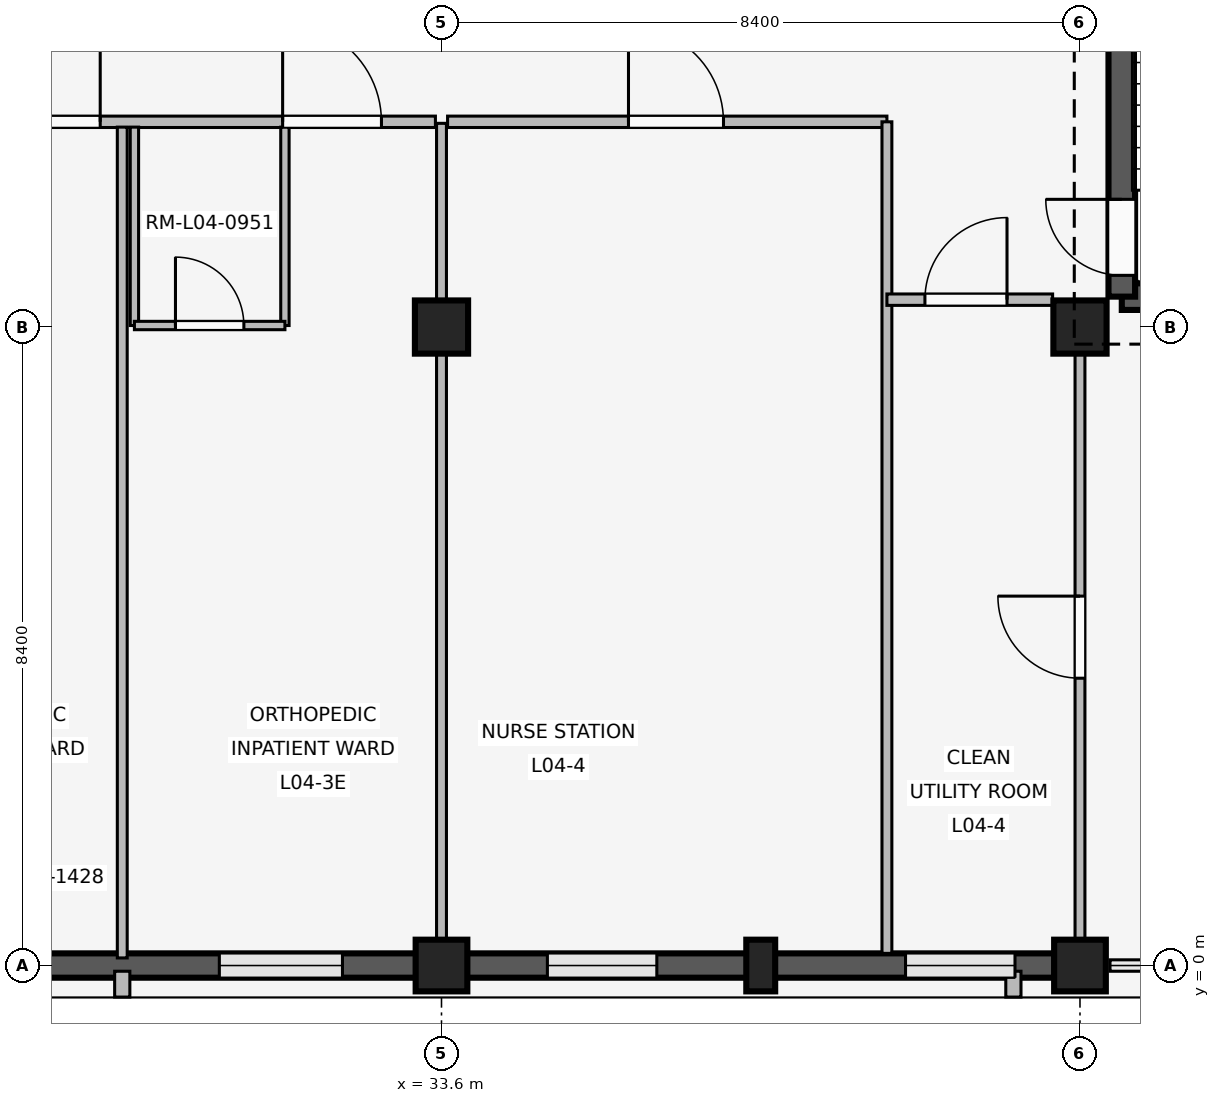
"""IFC4 building model, lengths in metres.
Left out: names, types, materials, properties, quantities, classifications, styles, units other than length and angle.
Written with IfcOpenShell. Run it as: python <this file> out.ifc"""

import sys

from ifc_helpers import new_model, si_unit, direction, frame, frame_2d, origin, origin_2d, place, context, subcontext, project, spatial, rectangle, extrude, element, fill, save


model = new_model("IFC4")
c1 = context("Model", 3, precision=1e-05, world=origin(), true_north=direction((0.0, 1.0)))
c2 = subcontext(c1, "Body", "Model", "MODEL_VIEW")
j1 = project(units=[si_unit("LENGTHUNIT", "METRE"), si_unit("PLANEANGLEUNIT", "RADIAN")], contexts=[c1])
p1 = place(None, origin())
s1 = spatial("IfcSite", under=j1, at=p1, CompositionType="ELEMENT")
p2 = place(p1, origin())
s2 = spatial("IfcBuilding", under=s1, at=p2, CompositionType="ELEMENT")
p3 = place(p2, frame((0.0, 0.0, 16.2)))
s3 = spatial("IfcBuildingStorey", under=s2, at=p3, CompositionType="ELEMENT", Elevation=16.2)
p4 = place(p3, frame((33.6, 0.0, 0.0), z_axis=(0.0, 0.0, 1.0), x_axis=(1.0, 0.0, 0.0)))
e1 = element("IfcColumn", 1, at=p4, inside=s3, PredefinedType="COLUMN", context=c2, shape_type="SweptSolid", body=[
    extrude(rectangle(XDim=0.68, YDim=0.68, at=origin_2d()), origin(), (0.0, 0.0, 1.0), 4.2),
])
p5 = place(p3, frame((33.6, 8.4, 0.0), z_axis=(0.0, 0.0, 1.0), x_axis=(1.0, 0.0, 0.0)))
e2 = element("IfcColumn", 2, at=p5, inside=s3, PredefinedType="COLUMN", context=c2, shape_type="SweptSolid", body=[
    extrude(rectangle(XDim=0.7, YDim=0.7, at=origin_2d()), origin(), (0.0, 0.0, 1.0), 4.2),
])
p6 = place(p3, frame((42.0, 0.0, 0.0), z_axis=(0.0, 0.0, 1.0), x_axis=(1.0, 0.0, 0.0)))
e3 = element("IfcColumn", 3, at=p6, inside=s3, PredefinedType="COLUMN", context=c2, shape_type="SweptSolid", body=[
    extrude(rectangle(XDim=0.68, YDim=0.68, at=origin_2d()), origin(), (0.0, 0.0, 1.0), 4.2),
])
p7 = place(p3, frame((42.0, 8.4, 0.0), z_axis=(0.0, 0.0, 1.0), x_axis=(1.0, 0.0, 0.0)))
e4 = element("IfcColumn", 4, at=p7, inside=s3, PredefinedType="COLUMN", context=c2, shape_type="SweptSolid", body=[
    extrude(rectangle(XDim=0.7, YDim=0.7, at=origin_2d()), origin(), (0.0, 0.0, 1.0), 4.2),
])
p8 = place(p3, frame((37.8, 0.0, 0.0), z_axis=(0.0, 0.0, 1.0), x_axis=(1.0, 0.0, 0.0)))
e5 = element("IfcColumn", 5, at=p8, inside=s3, PredefinedType="PILASTER", context=c2, shape_type="SweptSolid", body=[
    extrude(rectangle(XDim=0.38, YDim=0.68, at=origin_2d()), origin(), (0.0, 0.0, 1.0), 4.2),
])
p9 = place(p3, frame((33.265, 0.0, 0.0), z_axis=(0.0, 0.0, 1.0), x_axis=(-1.0, 0.0, 0.0)))
e6 = element("IfcWall", 6, at=p9, inside=s3, PredefinedType="SOLIDWALL", context=c2, shape_type="SweptSolid", body=[
    extrude(rectangle(XDim=7.73, YDim=0.32, at=frame_2d((3.865, 0.0))), origin(), (0.0, 0.0, 1.0), 3.32),
])
p10 = place(p9, frame((0.968, 0.0, 0.85)))
e7 = element("IfcOpeningElement", 7, at=p10, cuts=e6, PredefinedType="OPENING", context=c2, shape_type="SweptSolid", body=[
    extrude(rectangle(XDim=1.62, YDim=1.8, at=frame_2d((0.81, 0.9))), frame((0.0, 0.17, 0.0), z_axis=(0.0, -1.0, 0.0), x_axis=(1.0, 0.0, 0.0)), (0.0, 0.0, 1.0), 0.34),
])
p11 = place(p9, frame((5.142, 0.0, 0.85)))
e8 = element("IfcOpeningElement", 8, at=p11, cuts=e6, PredefinedType="OPENING", context=c2, shape_type="SweptSolid", body=[
    extrude(rectangle(XDim=1.62, YDim=1.8, at=frame_2d((0.81, 0.9))), frame((0.0, 0.17, 0.0), z_axis=(0.0, -1.0, 0.0), x_axis=(1.0, 0.0, 0.0)), (0.0, 0.0, 1.0), 0.34),
])
p12 = place(p3, frame((29.4, -0.075, 0.0), z_axis=(0.0, 0.0, 1.0), x_axis=(0.0, -1.0, 0.0)))
e9 = element("IfcWall", 9, at=p12, inside=s3, PredefinedType="ELEMENTEDWALL", context=c2, shape_type="SweptSolid", body=[
    extrude(rectangle(XDim=0.34, YDim=0.2, at=frame_2d((0.17, 0.0))), origin(), (0.0, 0.0, 1.0), 3.3),
])
p13 = place(p3, frame((41.665, 0.0, 0.0), z_axis=(0.0, 0.0, 1.0), x_axis=(-1.0, 0.0, 0.0)))
e10 = element("IfcWall", 10, at=p13, inside=s3, PredefinedType="SOLIDWALL", context=c2, shape_type="SweptSolid", body=[
    extrude(rectangle(XDim=7.73, YDim=0.32, at=frame_2d((3.865, 0.0))), origin(), (0.0, 0.0, 1.0), 3.32),
])
p14 = place(p13, frame((0.52, 0.0, 0.85)))
e11 = element("IfcOpeningElement", 11, at=p14, cuts=e10, PredefinedType="OPENING", context=c2, shape_type="SweptSolid", body=[
    extrude(rectangle(XDim=1.44, YDim=1.62, at=frame_2d((0.72, 0.81))), frame((0.0, 0.17, 0.0), z_axis=(0.0, -1.0, 0.0), x_axis=(1.0, 0.0, 0.0)), (0.0, 0.0, 1.0), 0.34),
])
p15 = place(p13, frame((5.232, 0.0, 0.85)))
e12 = element("IfcOpeningElement", 12, at=p15, cuts=e10, PredefinedType="OPENING", context=c2, shape_type="SweptSolid", body=[
    extrude(rectangle(XDim=1.44, YDim=1.62, at=frame_2d((0.72, 0.81))), frame((0.0, 0.17, 0.0), z_axis=(0.0, -1.0, 0.0), x_axis=(1.0, 0.0, 0.0)), (0.0, 0.0, 1.0), 0.34),
])
p16 = place(p3, frame((41.124, -0.075, 0.0), z_axis=(0.0, 0.0, 1.0), x_axis=(0.0, -1.0, 0.0)))
e13 = element("IfcWall", 13, at=p16, inside=s3, PredefinedType="ELEMENTEDWALL", context=c2, shape_type="SweptSolid", body=[
    extrude(rectangle(XDim=0.34, YDim=0.2, at=frame_2d((0.17, 0.0))), origin(), (0.0, 0.0, 1.0), 3.3),
])
p17 = place(p3, frame((42.55, 8.8, 0.0), z_axis=(0.0, 0.0, 1.0), x_axis=(1.0, 0.0, 0.0)))
e14 = element("IfcWall", 14, at=p17, inside=s3, PredefinedType="SHEAR", context=c2, shape_type="SweptSolid", body=[
    extrude(rectangle(XDim=7.5, YDim=0.35, at=frame_2d((3.75, 0.0))), origin(), (0.0, 0.0, 1.0), 3.92),
])
p18 = place(p17, frame((4.85, 0.0, 0.0)))
e15 = element("IfcOpeningElement", 15, at=p18, cuts=e14, PredefinedType="OPENING", context=c2, shape_type="SweptSolid", body=[
    extrude(rectangle(XDim=1.2, YDim=2.2, at=frame_2d((0.6, 1.1))), frame((0.0, 0.185, 0.0), z_axis=(0.0, -1.0, 0.0), x_axis=(1.0, 0.0, 0.0)), (0.0, 0.0, 1.0), 0.37),
])
p19 = place(p3, frame((42.55, 8.8, 0.0), z_axis=(0.0, 0.0, 1.0), x_axis=(0.0, 1.0, 0.0)))
e16 = element("IfcWall", 16, at=p19, inside=s3, PredefinedType="SHEAR", context=c2, shape_type="SweptSolid", body=[
    extrude(rectangle(XDim=7.55, YDim=0.35, at=frame_2d((3.775, 0.0))), origin(), (0.0, 0.0, 1.0), 3.92),
])
p20 = place(p19, frame((0.28, 0.0, 0.0)))
e17 = element("IfcOpeningElement", 17, at=p20, cuts=e16, PredefinedType="OPENING", context=c2, shape_type="SweptSolid", body=[
    extrude(rectangle(XDim=1.0, YDim=2.15, at=frame_2d((0.5, 1.075))), frame((0.0, 0.185, 0.0), z_axis=(0.0, -1.0, 0.0), x_axis=(1.0, 0.0, 0.0)), (0.0, 0.0, 1.0), 0.37),
])
p21 = place(p3, frame((25.28, 11.1, 0.0), z_axis=(0.0, 0.0, 1.0), x_axis=(1.0, 0.0, 0.0)))
e18 = element("IfcWall", 18, at=p21, inside=s3, PredefinedType="PARTITIONING", context=c2, shape_type="SweptSolid", body=[
    extrude(rectangle(XDim=8.24, YDim=0.15, at=frame_2d((4.12, 0.0))), origin(), (0.0, 0.0, 1.0), 3.3),
])
p22 = place(p21, frame((2.53, 0.0, 0.0)))
e19 = element("IfcOpeningElement", 19, at=p22, cuts=e18, PredefinedType="OPENING", context=c2, shape_type="SweptSolid", body=[
    extrude(rectangle(XDim=1.3, YDim=2.25, at=frame_2d((0.65, 1.125))), frame((0.0, 0.085, 0.0), z_axis=(0.0, -1.0, 0.0), x_axis=(1.0, 0.0, 0.0)), (0.0, 0.0, 1.0), 0.17),
])
p23 = place(p21, frame((6.23, 0.0, 0.0)))
e20 = element("IfcOpeningElement", 20, at=p23, cuts=e18, PredefinedType="OPENING", context=c2, shape_type="SweptSolid", body=[
    extrude(rectangle(XDim=1.3, YDim=2.25, at=frame_2d((0.65, 1.125))), frame((0.0, 0.085, 0.0), z_axis=(0.0, -1.0, 0.0), x_axis=(1.0, 0.0, 0.0)), (0.0, 0.0, 1.0), 0.17),
])
p24 = place(p3, frame((29.4, 0.1, 0.0), z_axis=(0.0, 0.0, 1.0), x_axis=(0.0, 1.0, 0.0)))
e21 = element("IfcWall", 21, at=p24, inside=s3, PredefinedType="PARTITIONING", context=c2, shape_type="SweptSolid", body=[
    extrude(rectangle(XDim=10.93, YDim=0.13, at=frame_2d((5.465, 0.0))), origin(), (0.0, 0.0, 1.0), 3.3),
])
for number, where, z_axis, x_axis in (
    (22, (29.56, 8.42, 0.0), (0.0, 0.0, 1.0), (0.0, 1.0, 0.0)),
    (23, (31.54, 8.42, 0.0), (0.0, 0.0, 1.0), (0.0, 1.0, 0.0)),
):
    element("IfcWall", number, at=place(p3, frame(where, z_axis=z_axis, x_axis=x_axis)), inside=s3, PredefinedType="PARTITIONING", context=c2, shape_type="SweptSolid", body=[
        extrude(rectangle(XDim=2.61, YDim=0.11, at=frame_2d((1.305, 0.0))), origin(), (0.0, 0.0, 1.0), 3.3),
    ])
p25 = place(p3, frame((29.56, 8.42, 0.0), z_axis=(0.0, 0.0, 1.0), x_axis=(1.0, 0.0, 0.0)))
e24 = element("IfcWall", 24, at=p25, inside=s3, PredefinedType="PARTITIONING", context=c2, shape_type="SweptSolid", body=[
    extrude(rectangle(XDim=1.98, YDim=0.11, at=frame_2d((0.99, 0.0))), origin(), (0.0, 0.0, 1.0), 3.3),
])
p26 = place(p25, frame((0.54, 0.0, 0.0)))
e25 = element("IfcOpeningElement", 25, at=p26, cuts=e24, PredefinedType="OPENING", context=c2, shape_type="SweptSolid", body=[
    extrude(rectangle(XDim=0.9, YDim=2.1, at=frame_2d((0.45, 1.05))), frame((0.0, 0.065, 0.0), z_axis=(0.0, -1.0, 0.0), x_axis=(1.0, 0.0, 0.0)), (0.0, 0.0, 1.0), 0.13),
])
p27 = place(p3, frame((28.05, 1.15, 0.0), z_axis=(0.0, 0.0, 1.0), x_axis=(1.0, 0.0, 0.0)))
e26 = element("IfcWall", 26, at=p27, inside=s3, PredefinedType="PLUMBINGWALL", context=c2, shape_type="SweptSolid", body=[
    extrude(rectangle(XDim=0.9, YDim=0.24, at=frame_2d((0.45, 0.0))), origin(), (0.0, 0.0, 1.0), 3.3),
])
p28 = place(p3, frame((33.6, 0.14, 0.0), z_axis=(0.0, 0.0, 1.0), x_axis=(0.0, 1.0, 0.0)))
e27 = element("IfcWall", 27, at=p28, inside=s3, PredefinedType="PARTITIONING", context=c2, shape_type="SweptSolid", body=[
    extrude(rectangle(XDim=10.94, YDim=0.13, at=frame_2d((5.47, 0.0))), origin(), (0.0, 0.0, 1.0), 3.3),
])
p29 = place(p3, frame((33.68, 11.1, 0.0), z_axis=(0.0, 0.0, 1.0), x_axis=(1.0, 0.0, 0.0)))
e28 = element("IfcWall", 28, at=p29, inside=s3, PredefinedType="PARTITIONING", context=c2, shape_type="SweptSolid", body=[
    extrude(rectangle(XDim=5.78, YDim=0.15, at=frame_2d((2.89, 0.0))), origin(), (0.0, 0.0, 1.0), 3.3),
])
p30 = place(p29, frame((2.38, 0.0, 0.0)))
e29 = element("IfcOpeningElement", 29, at=p30, cuts=e28, PredefinedType="OPENING", context=c2, shape_type="SweptSolid", body=[
    extrude(rectangle(XDim=1.25, YDim=2.2, at=frame_2d((0.625, 1.1))), frame((0.0, 0.085, 0.0), z_axis=(0.0, -1.0, 0.0), x_axis=(1.0, 0.0, 0.0)), (0.0, 0.0, 1.0), 0.17),
])
p31 = place(p3, frame((39.46, 0.16, 0.0), z_axis=(0.0, 0.0, 1.0), x_axis=(0.0, 1.0, 0.0)))
e30 = element("IfcWall", 30, at=p31, inside=s3, PredefinedType="PARTITIONING", context=c2, shape_type="SweptSolid", body=[
    extrude(rectangle(XDim=10.94, YDim=0.13, at=frame_2d((5.47, 0.0))), origin(), (0.0, 0.0, 1.0), 3.3),
])
p32 = place(p3, frame((39.46, 8.76, 0.0), z_axis=(0.0, 0.0, 1.0), x_axis=(1.0, 0.0, 0.0)))
e31 = element("IfcWall", 31, at=p32, inside=s3, PredefinedType="PARTITIONING", context=c2, shape_type="SweptSolid", body=[
    extrude(rectangle(XDim=2.18, YDim=0.15, at=frame_2d((1.09, 0.0))), origin(), (0.0, 0.0, 1.0), 3.3),
])
p33 = place(p32, frame((0.5, 0.0, 0.0)))
e32 = element("IfcOpeningElement", 32, at=p33, cuts=e31, PredefinedType="OPENING", context=c2, shape_type="SweptSolid", body=[
    extrude(rectangle(XDim=1.08, YDim=2.15, at=frame_2d((0.54, 1.075))), frame((0.0, 0.085, 0.0), z_axis=(0.0, -1.0, 0.0), x_axis=(1.0, 0.0, 0.0)), (0.0, 0.0, 1.0), 0.17),
])
p34 = place(p3, frame((42.0, 0.14, 0.0), z_axis=(0.0, 0.0, 1.0), x_axis=(0.0, 1.0, 0.0)))
e33 = element("IfcWall", 33, at=p34, inside=s3, PredefinedType="PARTITIONING", context=c2, shape_type="SweptSolid", body=[
    extrude(rectangle(XDim=8.21, YDim=0.13, at=frame_2d((4.105, 0.0))), origin(), (0.0, 0.0, 1.0), 3.3),
])
p35 = place(p34, frame((3.64, 0.0, 0.0)))
e34 = element("IfcOpeningElement", 34, at=p35, cuts=e33, PredefinedType="OPENING", context=c2, shape_type="SweptSolid", body=[
    extrude(rectangle(XDim=1.08, YDim=2.15, at=frame_2d((0.54, 1.075))), frame((0.0, 0.075, 0.0), z_axis=(0.0, -1.0, 0.0), x_axis=(1.0, 0.0, 0.0)), (0.0, 0.0, 1.0), 0.15),
])
p36 = place(p10, origin())
e35 = element("IfcWindow", 35, at=p36, inside=s3, PartitioningType="SINGLE_PANEL", PredefinedType="WINDOW", context=c2, shape_type="SweptSolid", body=[
    extrude(rectangle(XDim=1.62, YDim=1.8, at=frame_2d((0.81, 0.9))), frame((0.0, 0.03, 0.0), z_axis=(0.0, -1.0, 0.0), x_axis=(1.0, 0.0, 0.0)), (0.0, 0.0, 1.0), 0.06),
])
fill(e7, e35)
p37 = place(p14, origin())
e36 = element("IfcWindow", 36, at=p37, inside=s3, PartitioningType="SINGLE_PANEL", PredefinedType="WINDOW", context=c2, shape_type="SweptSolid", body=[
    extrude(rectangle(XDim=1.44, YDim=1.62, at=frame_2d((0.72, 0.81))), frame((0.0, 0.03, 0.0), z_axis=(0.0, -1.0, 0.0), x_axis=(1.0, 0.0, 0.0)), (0.0, 0.0, 1.0), 0.06),
])
fill(e11, e36)
p38 = place(p15, origin())
e37 = element("IfcWindow", 37, at=p38, inside=s3, PartitioningType="SINGLE_PANEL", PredefinedType="WINDOW", context=c2, shape_type="SweptSolid", body=[
    extrude(rectangle(XDim=1.44, YDim=1.62, at=frame_2d((0.72, 0.81))), frame((0.0, 0.03, 0.0), z_axis=(0.0, -1.0, 0.0), x_axis=(1.0, 0.0, 0.0)), (0.0, 0.0, 1.0), 0.06),
])
fill(e12, e37)
p39 = place(p20, origin())
e38 = element("IfcDoor", 38, at=p39, inside=s3, OperationType="SINGLE_SWING_RIGHT", PredefinedType="DOOR", context=c2, shape_type="SweptSolid", body=[
    extrude(rectangle(XDim=1.0, YDim=2.15, at=frame_2d((0.5, 1.075))), frame((0.0, 0.025, 0.0), z_axis=(0.0, -1.0, 0.0), x_axis=(1.0, 0.0, 0.0)), (0.0, 0.0, 1.0), 0.05),
])
fill(e17, e38)
p40 = place(p22, origin())
e39 = element("IfcDoor", 39, at=p40, inside=s3, OperationType="SINGLE_SWING_RIGHT", PredefinedType="DOOR", context=c2, shape_type="SweptSolid", body=[
    extrude(rectangle(XDim=1.3, YDim=2.25, at=frame_2d((0.65, 1.125))), frame((0.0, 0.025, 0.0), z_axis=(0.0, -1.0, 0.0), x_axis=(1.0, 0.0, 0.0)), (0.0, 0.0, 1.0), 0.05),
])
fill(e19, e39)
p41 = place(p23, origin())
e40 = element("IfcDoor", 40, at=p41, inside=s3, OperationType="SINGLE_SWING_LEFT", PredefinedType="DOOR", context=c2, shape_type="SweptSolid", body=[
    extrude(rectangle(XDim=1.3, YDim=2.25, at=frame_2d((0.65, 1.125))), frame((0.0, 0.025, 0.0), z_axis=(0.0, -1.0, 0.0), x_axis=(1.0, 0.0, 0.0)), (0.0, 0.0, 1.0), 0.05),
])
fill(e20, e40)
p42 = place(p26, origin())
e41 = element("IfcDoor", 41, at=p42, inside=s3, OperationType="SINGLE_SWING_LEFT", PredefinedType="DOOR", context=c2, shape_type="SweptSolid", body=[
    extrude(rectangle(XDim=0.9, YDim=2.1, at=frame_2d((0.45, 1.05))), frame((0.0, 0.025, 0.0), z_axis=(0.0, -1.0, 0.0), x_axis=(1.0, 0.0, 0.0)), (0.0, 0.0, 1.0), 0.05),
])
fill(e25, e41)
p43 = place(p30, origin())
e42 = element("IfcDoor", 42, at=p43, inside=s3, OperationType="SINGLE_SWING_LEFT", PredefinedType="DOOR", context=c2, shape_type="SweptSolid", body=[
    extrude(rectangle(XDim=1.25, YDim=2.2, at=frame_2d((0.625, 1.1))), frame((0.0, 0.025, 0.0), z_axis=(0.0, -1.0, 0.0), x_axis=(1.0, 0.0, 0.0)), (0.0, 0.0, 1.0), 0.05),
])
fill(e29, e42)
p44 = place(p33, origin())
e43 = element("IfcDoor", 43, at=p44, inside=s3, OperationType="SINGLE_SWING_RIGHT", PredefinedType="DOOR", context=c2, shape_type="SweptSolid", body=[
    extrude(rectangle(XDim=1.08, YDim=2.15, at=frame_2d((0.54, 1.075))), frame((0.0, 0.025, 0.0), z_axis=(0.0, -1.0, 0.0), x_axis=(1.0, 0.0, 0.0)), (0.0, 0.0, 1.0), 0.05),
])
fill(e32, e43)
p45 = place(p35, origin())
e44 = element("IfcDoor", 44, at=p45, inside=s3, OperationType="SINGLE_SWING_RIGHT", PredefinedType="DOOR", context=c2, shape_type="SweptSolid", body=[
    extrude(rectangle(XDim=1.08, YDim=2.15, at=frame_2d((0.54, 1.075))), frame((0.0, 0.025, 0.0), z_axis=(0.0, -1.0, 0.0), x_axis=(1.0, 0.0, 0.0)), (0.0, 0.0, 1.0), 0.05),
])
fill(e34, e44)
save(model, sys.argv[1])
